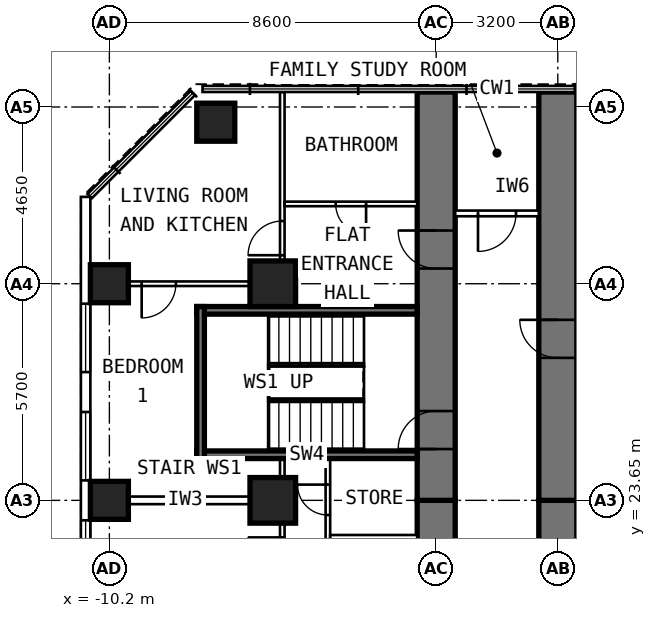
"""IFC4 building model, lengths in metres.
Left out: names, types, materials, properties, quantities, classifications, styles, units other than length and angle.
Written with IfcOpenShell. Run it as: python <this file> out.ifc"""

import sys

from ifc_helpers import new_model, si_unit, direction, frame, frame_2d, origin, origin_2d, place, context, subcontext, project, spatial, rectangle, extrude, element, fill, save


model = new_model("IFC4")
c1 = context("Model", 3, precision=1e-05, world=origin(), true_north=direction((0.0, 1.0)))
c2 = subcontext(c1, "Body", "Model", "MODEL_VIEW")
j1 = project(units=[si_unit("LENGTHUNIT", "METRE"), si_unit("PLANEANGLEUNIT", "RADIAN")], contexts=[c1])
p1 = place(None, origin())
s1 = spatial("IfcSite", under=j1, at=p1, CompositionType="ELEMENT")
p2 = place(p1, origin())
s2 = spatial("IfcBuilding", under=s1, at=p2, CompositionType="ELEMENT")
p3 = place(p2, frame((0.0, 0.0, 71.8)))
s3 = spatial("IfcBuildingStorey", under=s2, at=p3, CompositionType="ELEMENT", Elevation=71.8)
for number, where, z_axis, x_axis in (
    (1, (-10.2, 23.65, 0.0), (0.0, 0.0, 1.0), (0.0, 1.0, 0.0)),
    (2, (-10.2, 29.35, 0.0), (0.0, 0.0, 1.0), (0.0, 1.0, 0.0)),
    (3, (-7.4, 33.6, 0.0), (0.0, 0.0, 1.0), (0.0, 1.0, 0.0)),
):
    element("IfcColumn", number, at=place(p3, frame(where, z_axis=z_axis, x_axis=x_axis)), inside=s3, PredefinedType="COLUMN", context=c2, shape_type="SweptSolid", body=[
        extrude(rectangle(XDim=1.0, YDim=1.0, at=origin_2d()), origin(), (0.0, 0.0, 1.0), 3.6),
    ])
for number, where, z_axis, x_axis in (
    (4, (-5.9, 23.65, 0.0), (0.0, 0.0, 1.0), (0.0, 1.0, 0.0)),
    (5, (-5.9, 29.35, 0.0), (0.0, 0.0, 1.0), (0.0, 1.0, 0.0)),
):
    element("IfcColumn", number, at=place(p3, frame(where, z_axis=z_axis, x_axis=x_axis)), inside=s3, PredefinedType="COLUMN", context=c2, shape_type="SweptSolid", body=[
        extrude(rectangle(XDim=1.2, YDim=1.2, at=origin_2d()), origin(), (0.0, 0.0, 1.0), 3.6),
    ])
p4 = place(p3, frame((-1.6, 17.95, 0.0), z_axis=(0.0, 0.0, 1.0), x_axis=(0.0, 1.0, 0.0)))
e6 = element("IfcWall", 6, at=p4, inside=s3, PredefinedType="SHEAR", context=c2, shape_type="SweptSolid", body=[
    extrude(rectangle(XDim=5.7, YDim=1.0, at=frame_2d((2.85, 0.0))), origin(), (0.0, 0.0, 1.0), 3.6),
])
p5 = place(p3, frame((-1.6, 23.65, 0.0), z_axis=(0.0, 0.0, 1.0), x_axis=(0.0, 1.0, 0.0)))
e7 = element("IfcWall", 7, at=p5, inside=s3, PredefinedType="SHEAR", context=c2, shape_type="SweptSolid", body=[
    extrude(rectangle(XDim=10.745, YDim=1.0, at=frame_2d((5.373, 0.0))), origin(), (0.0, 0.0, 1.0), 3.6),
])
p6 = place(p5, frame((6.1, 0.0, 0.0)))
e8 = element("IfcOpeningElement", 8, at=p6, cuts=e7, PredefinedType="OPENING", context=c2, shape_type="SweptSolid", body=[
    extrude(rectangle(XDim=1.0, YDim=2.1, at=frame_2d((0.5, 1.05))), frame((0.0, 0.512, 0.0), z_axis=(0.0, -1.0, 0.0), x_axis=(1.0, 0.0, 0.0)), (0.0, 0.0, 1.0), 1.024),
])
p7 = place(p5, frame((1.35, 0.0, 0.0)))
e9 = element("IfcOpeningElement", 9, at=p7, cuts=e7, PredefinedType="OPENING", context=c2, shape_type="SweptSolid", body=[
    extrude(rectangle(XDim=1.0, YDim=2.1, at=frame_2d((0.5, 1.05))), frame((0.0, 0.512, 0.0), z_axis=(0.0, -1.0, 0.0), x_axis=(1.0, 0.0, 0.0)), (0.0, 0.0, 1.0), 1.024),
])
p8 = place(p3, frame((1.6, 17.95, 0.0), z_axis=(0.0, 0.0, 1.0), x_axis=(0.0, 1.0, 0.0)))
e10 = element("IfcWall", 10, at=p8, inside=s3, PredefinedType="SHEAR", context=c2, shape_type="SweptSolid", body=[
    extrude(rectangle(XDim=5.7, YDim=1.0, at=frame_2d((2.85, 0.0))), origin(), (0.0, 0.0, 1.0), 3.6),
])
p9 = place(p3, frame((1.6, 23.65, 0.0), z_axis=(0.0, 0.0, 1.0), x_axis=(0.0, 1.0, 0.0)))
e11 = element("IfcWall", 11, at=p9, inside=s3, PredefinedType="SHEAR", context=c2, shape_type="SweptSolid", body=[
    extrude(rectangle(XDim=10.745, YDim=1.0, at=frame_2d((5.373, 0.0))), origin(), (0.0, 0.0, 1.0), 3.6),
])
p10 = place(p9, frame((3.75, 0.0, 0.0)))
e12 = element("IfcOpeningElement", 12, at=p10, cuts=e11, PredefinedType="OPENING", context=c2, shape_type="SweptSolid", body=[
    extrude(rectangle(XDim=1.0, YDim=2.1, at=frame_2d((0.5, 1.05))), frame((0.0, 0.512, 0.0), z_axis=(0.0, -1.0, 0.0), x_axis=(1.0, 0.0, 0.0)), (0.0, 0.0, 1.0), 1.024),
])
p11 = place(p3, frame((-10.825, 6.148, 0.0), z_axis=(0.0, 0.0, 1.0), x_axis=(0.0, 1.0, 0.0)))
e13 = element("IfcWall", 13, at=p11, inside=s3, PredefinedType="SOLIDWALL", context=c2, shape_type="SweptSolid", body=[
    extrude(rectangle(XDim=25.487, YDim=0.25, at=frame_2d((12.744, 0.0))), origin(), (0.0, 0.0, 1.0), 3.35),
])
p12 = place(p11, frame((0.927, 0.0, 0.8)))
e14 = element("IfcOpeningElement", 14, at=p12, cuts=e13, PredefinedType="OPENING", context=c2, shape_type="SweptSolid", body=[
    extrude(rectangle(XDim=1.8, YDim=1.8, at=frame_2d((0.9, 0.9))), frame((0.0, 0.137, 0.0), z_axis=(0.0, -1.0, 0.0), x_axis=(1.0, 0.0, 0.0)), (0.0, 0.0, 1.0), 0.274),
])
p13 = place(p11, frame((3.777, 0.0, 0.8)))
e15 = element("IfcOpeningElement", 15, at=p13, cuts=e13, PredefinedType="OPENING", context=c2, shape_type="SweptSolid", body=[
    extrude(rectangle(XDim=1.8, YDim=1.8, at=frame_2d((0.9, 0.9))), frame((0.0, 0.137, 0.0), z_axis=(0.0, -1.0, 0.0), x_axis=(1.0, 0.0, 0.0)), (0.0, 0.0, 1.0), 0.274),
])
p14 = place(p11, frame((6.627, 0.0, 0.8)))
e16 = element("IfcOpeningElement", 16, at=p14, cuts=e13, PredefinedType="OPENING", context=c2, shape_type="SweptSolid", body=[
    extrude(rectangle(XDim=1.8, YDim=1.8, at=frame_2d((0.9, 0.9))), frame((0.0, 0.137, 0.0), z_axis=(0.0, -1.0, 0.0), x_axis=(1.0, 0.0, 0.0)), (0.0, 0.0, 1.0), 0.274),
])
p15 = place(p11, frame((9.477, 0.0, 0.8)))
e17 = element("IfcOpeningElement", 17, at=p15, cuts=e13, PredefinedType="OPENING", context=c2, shape_type="SweptSolid", body=[
    extrude(rectangle(XDim=1.8, YDim=1.8, at=frame_2d((0.9, 0.9))), frame((0.0, 0.137, 0.0), z_axis=(0.0, -1.0, 0.0), x_axis=(1.0, 0.0, 0.0)), (0.0, 0.0, 1.0), 0.274),
])
p16 = place(p11, frame((12.327, 0.0, 0.8)))
e18 = element("IfcOpeningElement", 18, at=p16, cuts=e13, PredefinedType="OPENING", context=c2, shape_type="SweptSolid", body=[
    extrude(rectangle(XDim=1.8, YDim=1.8, at=frame_2d((0.9, 0.9))), frame((0.0, 0.137, 0.0), z_axis=(0.0, -1.0, 0.0), x_axis=(1.0, 0.0, 0.0)), (0.0, 0.0, 1.0), 0.274),
])
p17 = place(p11, frame((15.177, 0.0, 0.8)))
e19 = element("IfcOpeningElement", 19, at=p17, cuts=e13, PredefinedType="OPENING", context=c2, shape_type="SweptSolid", body=[
    extrude(rectangle(XDim=1.8, YDim=1.8, at=frame_2d((0.9, 0.9))), frame((0.0, 0.137, 0.0), z_axis=(0.0, -1.0, 0.0), x_axis=(1.0, 0.0, 0.0)), (0.0, 0.0, 1.0), 0.274),
])
p18 = place(p11, frame((18.027, 0.0, 0.8)))
e20 = element("IfcOpeningElement", 20, at=p18, cuts=e13, PredefinedType="OPENING", context=c2, shape_type="SweptSolid", body=[
    extrude(rectangle(XDim=1.8, YDim=1.8, at=frame_2d((0.9, 0.9))), frame((0.0, 0.137, 0.0), z_axis=(0.0, -1.0, 0.0), x_axis=(1.0, 0.0, 0.0)), (0.0, 0.0, 1.0), 0.274),
])
p19 = place(p11, frame((20.877, 0.0, 0.8)))
e21 = element("IfcOpeningElement", 21, at=p19, cuts=e13, PredefinedType="OPENING", context=c2, shape_type="SweptSolid", body=[
    extrude(rectangle(XDim=1.8, YDim=1.8, at=frame_2d((0.9, 0.9))), frame((0.0, 0.137, 0.0), z_axis=(0.0, -1.0, 0.0), x_axis=(1.0, 0.0, 0.0)), (0.0, 0.0, 1.0), 0.274),
])
p20 = place(p3, frame((-4.45, 10.1, 0.0), z_axis=(0.0, 0.0, 1.0), x_axis=(0.0, 1.0, 0.0)))
e22 = element("IfcWall", 22, at=p20, inside=s3, PredefinedType="PARTITIONING", context=c2, shape_type="SweptSolid", body=[
    extrude(rectangle(XDim=14.65, YDim=0.12, at=frame_2d((7.325, 0.0))), origin(), (0.0, 0.0, 1.0), 3.35),
])
p21 = place(p20, frame((0.375, 0.0, 0.0)))
e23 = element("IfcOpeningElement", 23, at=p21, cuts=e22, PredefinedType="OPENING", context=c2, shape_type="SweptSolid", body=[
    extrude(rectangle(XDim=0.9, YDim=2.1, at=frame_2d((0.45, 1.05))), frame((0.0, 0.072, 0.0), z_axis=(0.0, -1.0, 0.0), x_axis=(1.0, 0.0, 0.0)), (0.0, 0.0, 1.0), 0.144),
])
p22 = place(p20, frame((2.275, 0.0, 0.0)))
e24 = element("IfcOpeningElement", 24, at=p22, cuts=e22, PredefinedType="OPENING", context=c2, shape_type="SweptSolid", body=[
    extrude(rectangle(XDim=0.8, YDim=2.1, at=frame_2d((0.4, 1.05))), frame((0.0, 0.072, 0.0), z_axis=(0.0, -1.0, 0.0), x_axis=(1.0, 0.0, 0.0)), (0.0, 0.0, 1.0), 0.144),
])
p23 = place(p20, frame((4.125, 0.0, 0.0)))
e25 = element("IfcOpeningElement", 25, at=p23, cuts=e22, PredefinedType="OPENING", context=c2, shape_type="SweptSolid", body=[
    extrude(rectangle(XDim=0.8, YDim=2.1, at=frame_2d((0.4, 1.05))), frame((0.0, 0.072, 0.0), z_axis=(0.0, -1.0, 0.0), x_axis=(1.0, 0.0, 0.0)), (0.0, 0.0, 1.0), 0.144),
])
p24 = place(p20, frame((6.1, 0.0, 0.0)))
e26 = element("IfcOpeningElement", 26, at=p24, cuts=e22, PredefinedType="OPENING", context=c2, shape_type="SweptSolid", body=[
    extrude(rectangle(XDim=0.9, YDim=2.1, at=frame_2d((0.45, 1.05))), frame((0.0, 0.072, 0.0), z_axis=(0.0, -1.0, 0.0), x_axis=(1.0, 0.0, 0.0)), (0.0, 0.0, 1.0), 0.144),
])
p25 = place(p20, frame((8.729, 0.0, 0.0)))
e27 = element("IfcOpeningElement", 27, at=p25, cuts=e22, PredefinedType="OPENING", context=c2, shape_type="SweptSolid", body=[
    extrude(rectangle(XDim=0.8, YDim=2.1, at=frame_2d((0.4, 1.05))), frame((0.0, 0.072, 0.0), z_axis=(0.0, -1.0, 0.0), x_axis=(1.0, 0.0, 0.0)), (0.0, 0.0, 1.0), 0.144),
])
p26 = place(p20, frame((11.143, 0.0, 0.0)))
e28 = element("IfcOpeningElement", 28, at=p26, cuts=e22, PredefinedType="OPENING", context=c2, shape_type="SweptSolid", body=[
    extrude(rectangle(XDim=0.9, YDim=2.1, at=frame_2d((0.45, 1.05))), frame((0.0, 0.072, 0.0), z_axis=(0.0, -1.0, 0.0), x_axis=(1.0, 0.0, 0.0)), (0.0, 0.0, 1.0), 0.144),
])
p27 = place(p20, frame((13.164, 0.0, 0.0)))
e29 = element("IfcOpeningElement", 29, at=p27, cuts=e22, PredefinedType="OPENING", context=c2, shape_type="SweptSolid", body=[
    extrude(rectangle(XDim=0.8, YDim=2.1, at=frame_2d((0.4, 1.05))), frame((0.0, 0.072, 0.0), z_axis=(0.0, -1.0, 0.0), x_axis=(1.0, 0.0, 0.0)), (0.0, 0.0, 1.0), 0.144),
])
p28 = place(p3, frame((-5.65, 9.6, 0.0), z_axis=(0.0, 0.0, 1.0), x_axis=(0.0, 1.0, 0.0)))
e30 = element("IfcWall", 30, at=p28, inside=s3, PredefinedType="PARTITIONING", context=c2, shape_type="SweptSolid", body=[
    extrude(rectangle(XDim=15.15, YDim=0.12, at=frame_2d((7.575, 0.0))), origin(), (0.0, 0.0, 1.0), 3.35),
])
p29 = place(p28, frame((1.0, 0.0, 0.0)))
e31 = element("IfcOpeningElement", 31, at=p29, cuts=e30, PredefinedType="OPENING", context=c2, shape_type="SweptSolid", body=[
    extrude(rectangle(XDim=0.9, YDim=2.1, at=frame_2d((0.45, 1.05))), frame((0.0, 0.072, 0.0), z_axis=(0.0, -1.0, 0.0), x_axis=(1.0, 0.0, 0.0)), (0.0, 0.0, 1.0), 0.144),
])
p30 = place(p28, frame((3.625, 0.0, 0.0)))
e32 = element("IfcOpeningElement", 32, at=p30, cuts=e30, PredefinedType="OPENING", context=c2, shape_type="SweptSolid", body=[
    extrude(rectangle(XDim=0.9, YDim=2.1, at=frame_2d((0.45, 1.05))), frame((0.0, 0.072, 0.0), z_axis=(0.0, -1.0, 0.0), x_axis=(1.0, 0.0, 0.0)), (0.0, 0.0, 1.0), 0.144),
])
p31 = place(p28, frame((6.475, 0.0, 0.0)))
e33 = element("IfcOpeningElement", 33, at=p31, cuts=e30, PredefinedType="OPENING", context=c2, shape_type="SweptSolid", body=[
    extrude(rectangle(XDim=0.9, YDim=2.1, at=frame_2d((0.45, 1.05))), frame((0.0, 0.072, 0.0), z_axis=(0.0, -1.0, 0.0), x_axis=(1.0, 0.0, 0.0)), (0.0, 0.0, 1.0), 0.144),
])
p32 = place(p28, frame((9.325, 0.0, 0.0)))
e34 = element("IfcOpeningElement", 34, at=p32, cuts=e30, PredefinedType="OPENING", context=c2, shape_type="SweptSolid", body=[
    extrude(rectangle(XDim=0.9, YDim=2.1, at=frame_2d((0.45, 1.05))), frame((0.0, 0.072, 0.0), z_axis=(0.0, -1.0, 0.0), x_axis=(1.0, 0.0, 0.0)), (0.0, 0.0, 1.0), 0.144),
])
p33 = place(p28, frame((12.175, 0.0, 0.0)))
e35 = element("IfcOpeningElement", 35, at=p33, cuts=e30, PredefinedType="OPENING", context=c2, shape_type="SweptSolid", body=[
    extrude(rectangle(XDim=0.9, YDim=2.1, at=frame_2d((0.45, 1.05))), frame((0.0, 0.072, 0.0), z_axis=(0.0, -1.0, 0.0), x_axis=(1.0, 0.0, 0.0)), (0.0, 0.0, 1.0), 0.144),
])
p34 = place(p3, frame((-2.1, 22.678, 0.0), z_axis=(0.0, 0.0, 1.0), x_axis=(-1.0, 0.0, 0.0)))
e36 = element("IfcWall", 36, at=p34, inside=s3, PredefinedType="PARTITIONING", context=c2, shape_type="SweptSolid", body=[
    extrude(rectangle(XDim=2.29, YDim=0.12, at=frame_2d((1.145, 0.0))), origin(), (0.0, 0.0, 1.0), 3.35),
])
p35 = place(p3, frame((-5.71, 23.65, 0.0), z_axis=(0.0, 0.0, 1.0), x_axis=(-1.0, 0.0, 0.0)))
e37 = element("IfcWall", 37, at=p35, inside=s3, PredefinedType="PARTITIONING", context=c2, shape_type="SweptSolid", body=[
    extrude(rectangle(XDim=4.99, YDim=0.2, at=frame_2d((2.495, 0.0))), origin(), (0.0, 0.0, 1.0), 2.45),
])
p36 = place(p3, frame((-5.71, 29.35, 0.0), z_axis=(0.0, 0.0, 1.0), x_axis=(-1.0, 0.0, 0.0)))
e38 = element("IfcWall", 38, at=p36, inside=s3, PredefinedType="PARTITIONING", context=c2, shape_type="SweptSolid", body=[
    extrude(rectangle(XDim=4.99, YDim=0.12, at=frame_2d((2.495, 0.0))), origin(), (0.0, 0.0, 1.0), 2.45),
])
p37 = place(p36, frame((2.74, 0.0, 0.0)))
e39 = element("IfcOpeningElement", 39, at=p37, cuts=e38, PredefinedType="OPENING", context=c2, shape_type="SweptSolid", body=[
    extrude(rectangle(XDim=0.9, YDim=2.1, at=frame_2d((0.45, 1.05))), frame((0.0, 0.072, 0.0), z_axis=(0.0, -1.0, 0.0), x_axis=(1.0, 0.0, 0.0)), (0.0, 0.0, 1.0), 0.144),
])
p38 = place(p3, frame((-5.65, 28.95, 0.0), z_axis=(0.0, 0.0, 1.0), x_axis=(0.0, 1.0, 0.0)))
e40 = element("IfcWall", 40, at=p38, inside=s3, PredefinedType="PARTITIONING", context=c2, shape_type="SweptSolid", body=[
    extrude(rectangle(XDim=5.445, YDim=0.12, at=frame_2d((2.723, 0.0))), origin(), (0.0, 0.0, 1.0), 3.35),
])
p39 = place(p38, frame((1.15, 0.0, 0.0)))
e41 = element("IfcOpeningElement", 41, at=p39, cuts=e40, PredefinedType="OPENING", context=c2, shape_type="SweptSolid", body=[
    extrude(rectangle(XDim=0.9, YDim=2.1, at=frame_2d((0.45, 1.05))), frame((0.0, 0.072, 0.0), z_axis=(0.0, -1.0, 0.0), x_axis=(1.0, 0.0, 0.0)), (0.0, 0.0, 1.0), 0.144),
])
p40 = place(p3, frame((-2.1, 31.45, 0.0), z_axis=(0.0, 0.0, 1.0), x_axis=(-1.0, 0.0, 0.0)))
e42 = element("IfcWall", 42, at=p40, inside=s3, PredefinedType="PARTITIONING", context=c2, shape_type="SweptSolid", body=[
    extrude(rectangle(XDim=3.49, YDim=0.12, at=frame_2d((1.745, 0.0))), origin(), (0.0, 0.0, 1.0), 3.35),
])
p41 = place(p40, frame((1.345, 0.0, 0.0)))
e43 = element("IfcOpeningElement", 43, at=p41, cuts=e42, PredefinedType="OPENING", context=c2, shape_type="SweptSolid", body=[
    extrude(rectangle(XDim=0.8, YDim=2.1, at=frame_2d((0.4, 1.05))), frame((0.0, 0.072, 0.0), z_axis=(0.0, -1.0, 0.0), x_axis=(1.0, 0.0, 0.0)), (0.0, 0.0, 1.0), 0.144),
])
p42 = place(p3, frame((2.1, 26.5, 0.0), z_axis=(0.0, 0.0, 1.0), x_axis=(1.0, 0.0, 0.0)))
e44 = element("IfcWall", 44, at=p42, inside=s3, PredefinedType="PARTITIONING", context=c2, shape_type="SweptSolid", body=[
    extrude(rectangle(XDim=8.6, YDim=0.2, at=frame_2d((4.3, 0.0))), origin(), (0.0, 0.0, 1.0), 3.35),
])
p43 = place(p3, frame((1.1, 31.2, 0.0), z_axis=(0.0, 0.0, 1.0), x_axis=(-1.0, 0.0, 0.0)))
e45 = element("IfcWall", 45, at=p43, inside=s3, PredefinedType="PARTITIONING", context=c2, shape_type="SweptSolid", body=[
    extrude(rectangle(XDim=2.2, YDim=0.15, at=frame_2d((1.1, 0.0))), origin(), (0.0, 0.0, 1.0), 3.35),
])
p44 = place(p43, frame((0.6, 0.0, 0.0)))
e46 = element("IfcOpeningElement", 46, at=p44, cuts=e45, PredefinedType="OPENING", context=c2, shape_type="SweptSolid", body=[
    extrude(rectangle(XDim=1.0, YDim=2.1, at=frame_2d((0.5, 1.05))), frame((0.0, 0.087, 0.0), z_axis=(0.0, -1.0, 0.0), x_axis=(1.0, 0.0, 0.0)), (0.0, 0.0, 1.0), 0.174),
])
for number, where, z_axis, x_axis in (
    (47, (-2.1, 24.85, 0.0), (0.0, 0.0, 1.0), (-1.0, 0.0, 0.0)),
    (48, (-2.1, 28.65, 0.0), (0.0, 0.0, 1.0), (-1.0, 0.0, 0.0)),
):
    element("IfcWall", number, at=place(p3, frame(where, z_axis=z_axis, x_axis=x_axis)), inside=s3, PredefinedType="SHEAR", context=c2, shape_type="SweptSolid", body=[
        extrude(rectangle(XDim=5.8, YDim=0.2, at=frame_2d((2.9, 0.0))), origin(), (0.0, 0.0, 1.0), 3.33),
    ])
p45 = place(p3, frame((-7.8, 24.75, 0.0), z_axis=(0.0, 0.0, 1.0), x_axis=(0.0, 1.0, 0.0)))
e49 = element("IfcWall", 49, at=p45, inside=s3, PredefinedType="SHEAR", context=c2, shape_type="SweptSolid", body=[
    extrude(rectangle(XDim=4.0, YDim=0.2, at=frame_2d((2.0, 0.0))), origin(), (0.0, 0.0, 1.0), 3.33),
])
p46 = place(p17, origin())
e50 = element("IfcWindow", 50, at=p46, inside=s3, PartitioningType="SINGLE_PANEL", PredefinedType="WINDOW", context=c2, shape_type="SweptSolid", body=[
    extrude(rectangle(XDim=1.8, YDim=1.8, at=frame_2d((0.9, 0.9))), frame((0.0, 0.03, 0.0), z_axis=(0.0, -1.0, 0.0), x_axis=(1.0, 0.0, 0.0)), (0.0, 0.0, 1.0), 0.06),
])
fill(e19, e50)
p47 = place(p18, origin())
e51 = element("IfcWindow", 51, at=p47, inside=s3, PartitioningType="SINGLE_PANEL", PredefinedType="WINDOW", context=c2, shape_type="SweptSolid", body=[
    extrude(rectangle(XDim=1.8, YDim=1.8, at=frame_2d((0.9, 0.9))), frame((0.0, 0.03, 0.0), z_axis=(0.0, -1.0, 0.0), x_axis=(1.0, 0.0, 0.0)), (0.0, 0.0, 1.0), 0.06),
])
fill(e20, e51)
p48 = place(p19, origin())
e52 = element("IfcWindow", 52, at=p48, inside=s3, PartitioningType="SINGLE_PANEL", PredefinedType="WINDOW", context=c2, shape_type="SweptSolid", body=[
    extrude(rectangle(XDim=1.8, YDim=1.8, at=frame_2d((0.9, 0.9))), frame((0.0, 0.03, 0.0), z_axis=(0.0, -1.0, 0.0), x_axis=(1.0, 0.0, 0.0)), (0.0, 0.0, 1.0), 0.06),
])
fill(e21, e52)
p49 = place(p33, origin())
e53 = element("IfcDoor", 53, at=p49, inside=s3, OperationType="SINGLE_SWING_RIGHT", PredefinedType="DOOR", context=c2, shape_type="SweptSolid", body=[
    extrude(rectangle(XDim=0.9, YDim=2.1, at=frame_2d((0.45, 1.05))), frame((0.0, 0.025, 0.0), z_axis=(0.0, -1.0, 0.0), x_axis=(1.0, 0.0, 0.0)), (0.0, 0.0, 1.0), 0.05),
])
fill(e35, e53)
p50 = place(p27, origin())
e54 = element("IfcDoor", 54, at=p50, inside=s3, OperationType="SINGLE_SWING_RIGHT", PredefinedType="DOOR", context=c2, shape_type="SweptSolid", body=[
    extrude(rectangle(XDim=0.8, YDim=2.1, at=frame_2d((0.4, 1.05))), frame((0.0, 0.025, 0.0), z_axis=(0.0, -1.0, 0.0), x_axis=(1.0, 0.0, 0.0)), (0.0, 0.0, 1.0), 0.05),
])
fill(e29, e54)
p51 = place(p37, origin())
e55 = element("IfcDoor", 55, at=p51, inside=s3, OperationType="SINGLE_SWING_RIGHT", PredefinedType="DOOR", context=c2, shape_type="SweptSolid", body=[
    extrude(rectangle(XDim=0.9, YDim=2.1, at=frame_2d((0.45, 1.05))), frame((0.0, 0.025, 0.0), z_axis=(0.0, -1.0, 0.0), x_axis=(1.0, 0.0, 0.0)), (0.0, 0.0, 1.0), 0.05),
])
fill(e39, e55)
p52 = place(p39, origin())
e56 = element("IfcDoor", 56, at=p52, inside=s3, OperationType="SINGLE_SWING_LEFT", PredefinedType="DOOR", context=c2, shape_type="SweptSolid", body=[
    extrude(rectangle(XDim=0.9, YDim=2.1, at=frame_2d((0.45, 1.05))), frame((0.0, 0.025, 0.0), z_axis=(0.0, -1.0, 0.0), x_axis=(1.0, 0.0, 0.0)), (0.0, 0.0, 1.0), 0.05),
])
fill(e41, e56)
p53 = place(p41, origin())
e57 = element("IfcDoor", 57, at=p53, inside=s3, OperationType="SINGLE_SWING_LEFT", PredefinedType="DOOR", context=c2, shape_type="SweptSolid", body=[
    extrude(rectangle(XDim=0.8, YDim=2.1, at=frame_2d((0.4, 1.05))), frame((0.0, 0.025, 0.0), z_axis=(0.0, -1.0, 0.0), x_axis=(1.0, 0.0, 0.0)), (0.0, 0.0, 1.0), 0.05),
])
fill(e43, e57)
p54 = place(p6, origin())
e58 = element("IfcDoor", 58, at=p54, inside=s3, OperationType="SINGLE_SWING_RIGHT", PredefinedType="DOOR", context=c2, shape_type="SweptSolid", body=[
    extrude(rectangle(XDim=1.0, YDim=2.1, at=frame_2d((0.5, 1.05))), frame((0.0, 0.25, 0.0), z_axis=(0.0, -1.0, 0.0), x_axis=(1.0, 0.0, 0.0)), (0.0, 0.0, 1.0), 0.5),
])
fill(e8, e58)
p55 = place(p10, origin())
e59 = element("IfcDoor", 59, at=p55, inside=s3, OperationType="SINGLE_SWING_RIGHT", PredefinedType="DOOR", context=c2, shape_type="SweptSolid", body=[
    extrude(rectangle(XDim=1.0, YDim=2.1, at=frame_2d((0.5, 1.05))), frame((0.0, 0.25, 0.0), z_axis=(0.0, -1.0, 0.0), x_axis=(1.0, 0.0, 0.0)), (0.0, 0.0, 1.0), 0.5),
])
fill(e12, e59)
p56 = place(p44, origin())
e60 = element("IfcDoor", 60, at=p56, inside=s3, OperationType="SINGLE_SWING_RIGHT", PredefinedType="DOOR", context=c2, shape_type="SweptSolid", body=[
    extrude(rectangle(XDim=1.0, YDim=2.1, at=frame_2d((0.5, 1.05))), frame((0.0, 0.025, 0.0), z_axis=(0.0, -1.0, 0.0), x_axis=(1.0, 0.0, 0.0)), (0.0, 0.0, 1.0), 0.05),
])
fill(e46, e60)
p57 = place(p7, origin())
e61 = element("IfcDoor", 61, at=p57, inside=s3, OperationType="SINGLE_SWING_LEFT", PredefinedType="DOOR", context=c2, shape_type="SweptSolid", body=[
    extrude(rectangle(XDim=1.0, YDim=2.1, at=frame_2d((0.5, 1.05))), frame((0.0, 0.25, 0.0), z_axis=(0.0, -1.0, 0.0), x_axis=(1.0, 0.0, 0.0)), (0.0, 0.0, 1.0), 0.5),
])
fill(e9, e61)
save(model, sys.argv[1])
